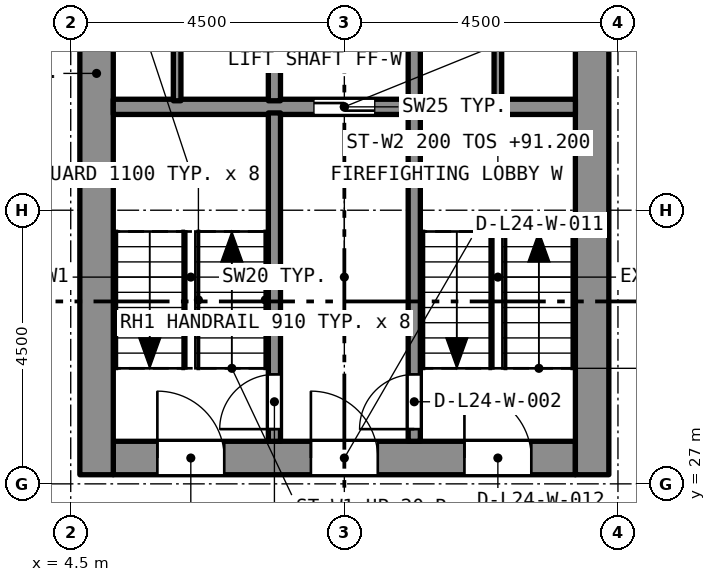
"""IFC4 building model, lengths in metres.
Left out: names, types, materials, properties, quantities, classifications, styles, units other than length and angle.
Written with IfcOpenShell. Run it as: python <this file> out.ifc"""

import sys

from ifc_helpers import new_model, si_unit, direction, frame, frame_2d, origin, place, context, subcontext, project, spatial, rectangle, extrude, element, fill, save


model = new_model("IFC4")
c1 = context("Model", 3, precision=1e-05, world=origin(), true_north=direction((0.0, 1.0)))
c2 = subcontext(c1, "Body", "Model", "MODEL_VIEW")
j1 = project(units=[si_unit("LENGTHUNIT", "METRE"), si_unit("PLANEANGLEUNIT", "RADIAN")], contexts=[c1])
p1 = place(None, origin())
s1 = spatial("IfcSite", under=j1, at=p1, CompositionType="ELEMENT")
p2 = place(p1, origin())
s2 = spatial("IfcBuilding", under=s1, at=p2, CompositionType="ELEMENT")
p3 = place(p2, frame((0.0, 0.0, 89.6)))
s3 = spatial("IfcBuildingStorey", under=s2, at=p3, CompositionType="ELEMENT", Elevation=89.6)
p4 = place(p3, frame((5.2, 27.425, 0.0), z_axis=(0.0, 0.0, 1.0), x_axis=(1.0, 0.0, 0.0)))
e1 = element("IfcWall", 1, at=p4, inside=s3, PredefinedType="SOLIDWALL", context=c2, shape_type="SweptSolid", body=[
    extrude(rectangle(XDim=7.6, YDim=0.55, at=frame_2d((3.8, 0.0))), origin(), (0.0, 0.0, 1.0), 3.2),
])
p5 = place(p4, frame((0.725, 0.0, 0.0)))
e2 = element("IfcOpeningElement", 2, at=p5, cuts=e1, PredefinedType="OPENING", context=c2, shape_type="SweptSolid", body=[
    extrude(rectangle(XDim=1.1, YDim=2.1, at=frame_2d((0.55, 1.05))), frame((0.0, 0.285, 0.0), z_axis=(0.0, -1.0, 0.0), x_axis=(1.0, 0.0, 0.0)), (0.0, 0.0, 1.0), 0.57),
])
p6 = place(p4, frame((3.25, 0.0, 0.0)))
e3 = element("IfcOpeningElement", 3, at=p6, cuts=e1, PredefinedType="OPENING", context=c2, shape_type="SweptSolid", body=[
    extrude(rectangle(XDim=1.1, YDim=2.1, at=frame_2d((0.55, 1.05))), frame((0.0, 0.285, 0.0), z_axis=(0.0, -1.0, 0.0), x_axis=(1.0, 0.0, 0.0)), (0.0, 0.0, 1.0), 0.57),
])
p7 = place(p4, frame((5.775, 0.0, 0.0)))
e4 = element("IfcOpeningElement", 4, at=p7, cuts=e1, PredefinedType="OPENING", context=c2, shape_type="SweptSolid", body=[
    extrude(rectangle(XDim=1.1, YDim=2.1, at=frame_2d((0.55, 1.05))), frame((0.0, 0.285, 0.0), z_axis=(0.0, -1.0, 0.0), x_axis=(1.0, 0.0, 0.0)), (0.0, 0.0, 1.0), 0.57),
])
p8 = place(p3, frame((4.925, 27.15, 0.0), z_axis=(0.0, 0.0, 1.0), x_axis=(0.0, 1.0, 0.0)))
e5 = element("IfcWall", 5, at=p8, inside=s3, PredefinedType="SOLIDWALL", context=c2, shape_type="SweptSolid", body=[
    extrude(rectangle(XDim=13.2, YDim=0.55, at=frame_2d((6.6, 0.0))), origin(), (0.0, 0.0, 1.0), 3.2),
])
p9 = place(p8, frame((8.8, 0.0, 0.0)))
e6 = element("IfcOpeningElement", 6, at=p9, cuts=e5, PredefinedType="OPENING", context=c2, shape_type="SweptSolid", body=[
    extrude(rectangle(XDim=1.2, YDim=2.1, at=frame_2d((0.6, 1.05))), frame((0.0, 0.285, 0.0), z_axis=(0.0, -1.0, 0.0), x_axis=(1.0, 0.0, 0.0)), (0.0, 0.0, 1.0), 0.57),
])
p10 = place(p3, frame((13.075, 27.15, 0.0), z_axis=(0.0, 0.0, 1.0), x_axis=(0.0, 1.0, 0.0)))
e7 = element("IfcWall", 7, at=p10, inside=s3, PredefinedType="SOLIDWALL", context=c2, shape_type="SweptSolid", body=[
    extrude(rectangle(XDim=13.2, YDim=0.55, at=frame_2d((6.6, 0.0))), origin(), (0.0, 0.0, 1.0), 3.2),
])
p11 = place(p10, frame((10.95, 0.0, 0.0)))
e8 = element("IfcOpeningElement", 8, at=p11, cuts=e7, PredefinedType="OPENING", context=c2, shape_type="SweptSolid", body=[
    extrude(rectangle(XDim=1.1, YDim=2.1, at=frame_2d((0.55, 1.05))), frame((0.0, 0.285, 0.0), z_axis=(0.0, -1.0, 0.0), x_axis=(1.0, 0.0, 0.0)), (0.0, 0.0, 1.0), 0.57),
])
p12 = place(p10, frame((8.8, 0.0, 0.0)))
e9 = element("IfcOpeningElement", 9, at=p12, cuts=e7, PredefinedType="OPENING", context=c2, shape_type="SweptSolid", body=[
    extrude(rectangle(XDim=1.2, YDim=2.1, at=frame_2d((0.6, 1.05))), frame((0.0, 0.285, 0.0), z_axis=(0.0, -1.0, 0.0), x_axis=(1.0, 0.0, 0.0)), (0.0, 0.0, 1.0), 0.57),
])
p13 = place(p3, frame((5.2, 33.2, 0.0), z_axis=(0.0, 0.0, 1.0), x_axis=(1.0, 0.0, 0.0)))
e10 = element("IfcWall", 10, at=p13, inside=s3, PredefinedType="SOLIDWALL", context=c2, shape_type="SweptSolid", body=[
    extrude(rectangle(XDim=7.6, YDim=0.25, at=frame_2d((3.8, 0.0))), origin(), (0.0, 0.0, 1.0), 2.9),
])
p14 = place(p13, frame((3.3, 0.0, 0.0)))
e11 = element("IfcOpeningElement", 11, at=p14, cuts=e10, PredefinedType="OPENING", context=c2, shape_type="SweptSolid", body=[
    extrude(rectangle(XDim=1.0, YDim=2.1, at=frame_2d((0.5, 1.05))), frame((0.0, 0.135, 0.0), z_axis=(0.0, -1.0, 0.0), x_axis=(1.0, 0.0, 0.0)), (0.0, 0.0, 1.0), 0.27),
])
p15 = place(p3, frame((7.85, 27.7, 0.0), z_axis=(0.0, 0.0, 1.0), x_axis=(0.0, 1.0, 0.0)))
e12 = element("IfcWall", 12, at=p15, inside=s3, PredefinedType="SOLIDWALL", context=c2, shape_type="SweptSolid", body=[
    extrude(rectangle(XDim=5.4, YDim=0.2, at=frame_2d((2.7, 0.0))), origin(), (0.0, 0.0, 1.0), 2.9),
])
p16 = place(p15, frame((0.2, 0.0, 0.0)))
e13 = element("IfcOpeningElement", 13, at=p16, cuts=e12, PredefinedType="OPENING", context=c2, shape_type="SweptSolid", body=[
    extrude(rectangle(XDim=0.9, YDim=2.1, at=frame_2d((0.45, 1.05))), frame((0.0, 0.11, 0.0), z_axis=(0.0, -1.0, 0.0), x_axis=(1.0, 0.0, 0.0)), (0.0, 0.0, 1.0), 0.22),
])
p17 = place(p3, frame((10.15, 27.7, 0.0), z_axis=(0.0, 0.0, 1.0), x_axis=(0.0, 1.0, 0.0)))
e14 = element("IfcWall", 14, at=p17, inside=s3, PredefinedType="SOLIDWALL", context=c2, shape_type="SweptSolid", body=[
    extrude(rectangle(XDim=5.4, YDim=0.2, at=frame_2d((2.7, 0.0))), origin(), (0.0, 0.0, 1.0), 2.9),
])
p18 = place(p17, frame((0.2, 0.0, 0.0)))
e15 = element("IfcOpeningElement", 15, at=p18, cuts=e14, PredefinedType="OPENING", context=c2, shape_type="SweptSolid", body=[
    extrude(rectangle(XDim=0.9, YDim=2.1, at=frame_2d((0.45, 1.05))), frame((0.0, 0.11, 0.0), z_axis=(0.0, -1.0, 0.0), x_axis=(1.0, 0.0, 0.0)), (0.0, 0.0, 1.0), 0.22),
])
for number, where, z_axis, x_axis in (
    (16, (7.85, 33.3, 0.0), (0.0, 0.0, 1.0), (0.0, 1.0, 0.0)),
    (17, (10.15, 33.3, 0.0), (0.0, 0.0, 1.0), (0.0, 1.0, 0.0)),
):
    element("IfcWall", number, at=place(p3, frame(where, z_axis=z_axis, x_axis=x_axis)), inside=s3, PredefinedType="SOLIDWALL", context=c2, shape_type="SweptSolid", body=[
        extrude(rectangle(XDim=2.3, YDim=0.2, at=frame_2d((1.15, 0.0))), origin(), (0.0, 0.0, 1.0), 2.9),
    ])
for number, where, z_axis, x_axis in (
    (18, (6.25, 33.3, 0.0), (0.0, 0.0, 1.0), (0.0, 1.0, 0.0)),
    (19, (11.525, 33.3, 0.0), (0.0, 0.0, 1.0), (0.0, 1.0, 0.0)),
):
    element("IfcWall", number, at=place(p3, frame(where, z_axis=z_axis, x_axis=x_axis)), inside=s3, PredefinedType="PARTITIONING", context=c2, shape_type="SweptSolid", body=[
        extrude(rectangle(XDim=2.3, YDim=0.125, at=frame_2d((1.15, 0.0))), origin(), (0.0, 0.0, 1.0), 2.9),
    ])
p19 = place(p16, origin())
e20 = element("IfcDoor", 20, at=p19, inside=s3, OperationType="SINGLE_SWING_LEFT", PredefinedType="DOOR", context=c2, shape_type="SweptSolid", body=[
    extrude(rectangle(XDim=0.9, YDim=2.1, at=frame_2d((0.45, 1.05))), frame((0.0, 0.025, 0.0), z_axis=(0.0, -1.0, 0.0), x_axis=(1.0, 0.0, 0.0)), (0.0, 0.0, 1.0), 0.05),
])
fill(e13, e20)
p20 = place(p18, origin())
e21 = element("IfcDoor", 21, at=p20, inside=s3, OperationType="SINGLE_SWING_LEFT", PredefinedType="DOOR", context=c2, shape_type="SweptSolid", body=[
    extrude(rectangle(XDim=0.9, YDim=2.1, at=frame_2d((0.45, 1.05))), frame((0.0, 0.025, 0.0), z_axis=(0.0, -1.0, 0.0), x_axis=(1.0, 0.0, 0.0)), (0.0, 0.0, 1.0), 0.05),
])
fill(e15, e21)
p21 = place(p14, origin())
e22 = element("IfcDoor", 22, at=p21, inside=s3, OperationType="SLIDING_TO_LEFT", PredefinedType="DOOR", context=c2, shape_type="SweptSolid", body=[
    extrude(rectangle(XDim=1.0, YDim=2.1, at=frame_2d((0.5, 1.05))), frame((0.0, 0.025, 0.0), z_axis=(0.0, -1.0, 0.0), x_axis=(1.0, 0.0, 0.0)), (0.0, 0.0, 1.0), 0.05),
])
fill(e11, e22)
p22 = place(p5, origin())
e23 = element("IfcDoor", 23, at=p22, inside=s3, OperationType="SINGLE_SWING_LEFT", PredefinedType="DOOR", context=c2, shape_type="SweptSolid", body=[
    extrude(rectangle(XDim=1.1, YDim=2.1, at=frame_2d((0.55, 1.05))), frame((0.0, 0.025, 0.0), z_axis=(0.0, -1.0, 0.0), x_axis=(1.0, 0.0, 0.0)), (0.0, 0.0, 1.0), 0.05),
])
fill(e2, e23)
p23 = place(p6, origin())
e24 = element("IfcDoor", 24, at=p23, inside=s3, OperationType="SINGLE_SWING_LEFT", PredefinedType="DOOR", context=c2, shape_type="SweptSolid", body=[
    extrude(rectangle(XDim=1.1, YDim=2.1, at=frame_2d((0.55, 1.05))), frame((0.0, 0.025, 0.0), z_axis=(0.0, -1.0, 0.0), x_axis=(1.0, 0.0, 0.0)), (0.0, 0.0, 1.0), 0.05),
])
fill(e3, e24)
p24 = place(p7, origin())
e25 = element("IfcDoor", 25, at=p24, inside=s3, OperationType="SINGLE_SWING_LEFT", PredefinedType="DOOR", context=c2, shape_type="SweptSolid", body=[
    extrude(rectangle(XDim=1.1, YDim=2.1, at=frame_2d((0.55, 1.05))), frame((0.0, 0.025, 0.0), z_axis=(0.0, -1.0, 0.0), x_axis=(1.0, 0.0, 0.0)), (0.0, 0.0, 1.0), 0.05),
])
fill(e4, e25)
save(model, sys.argv[1])
